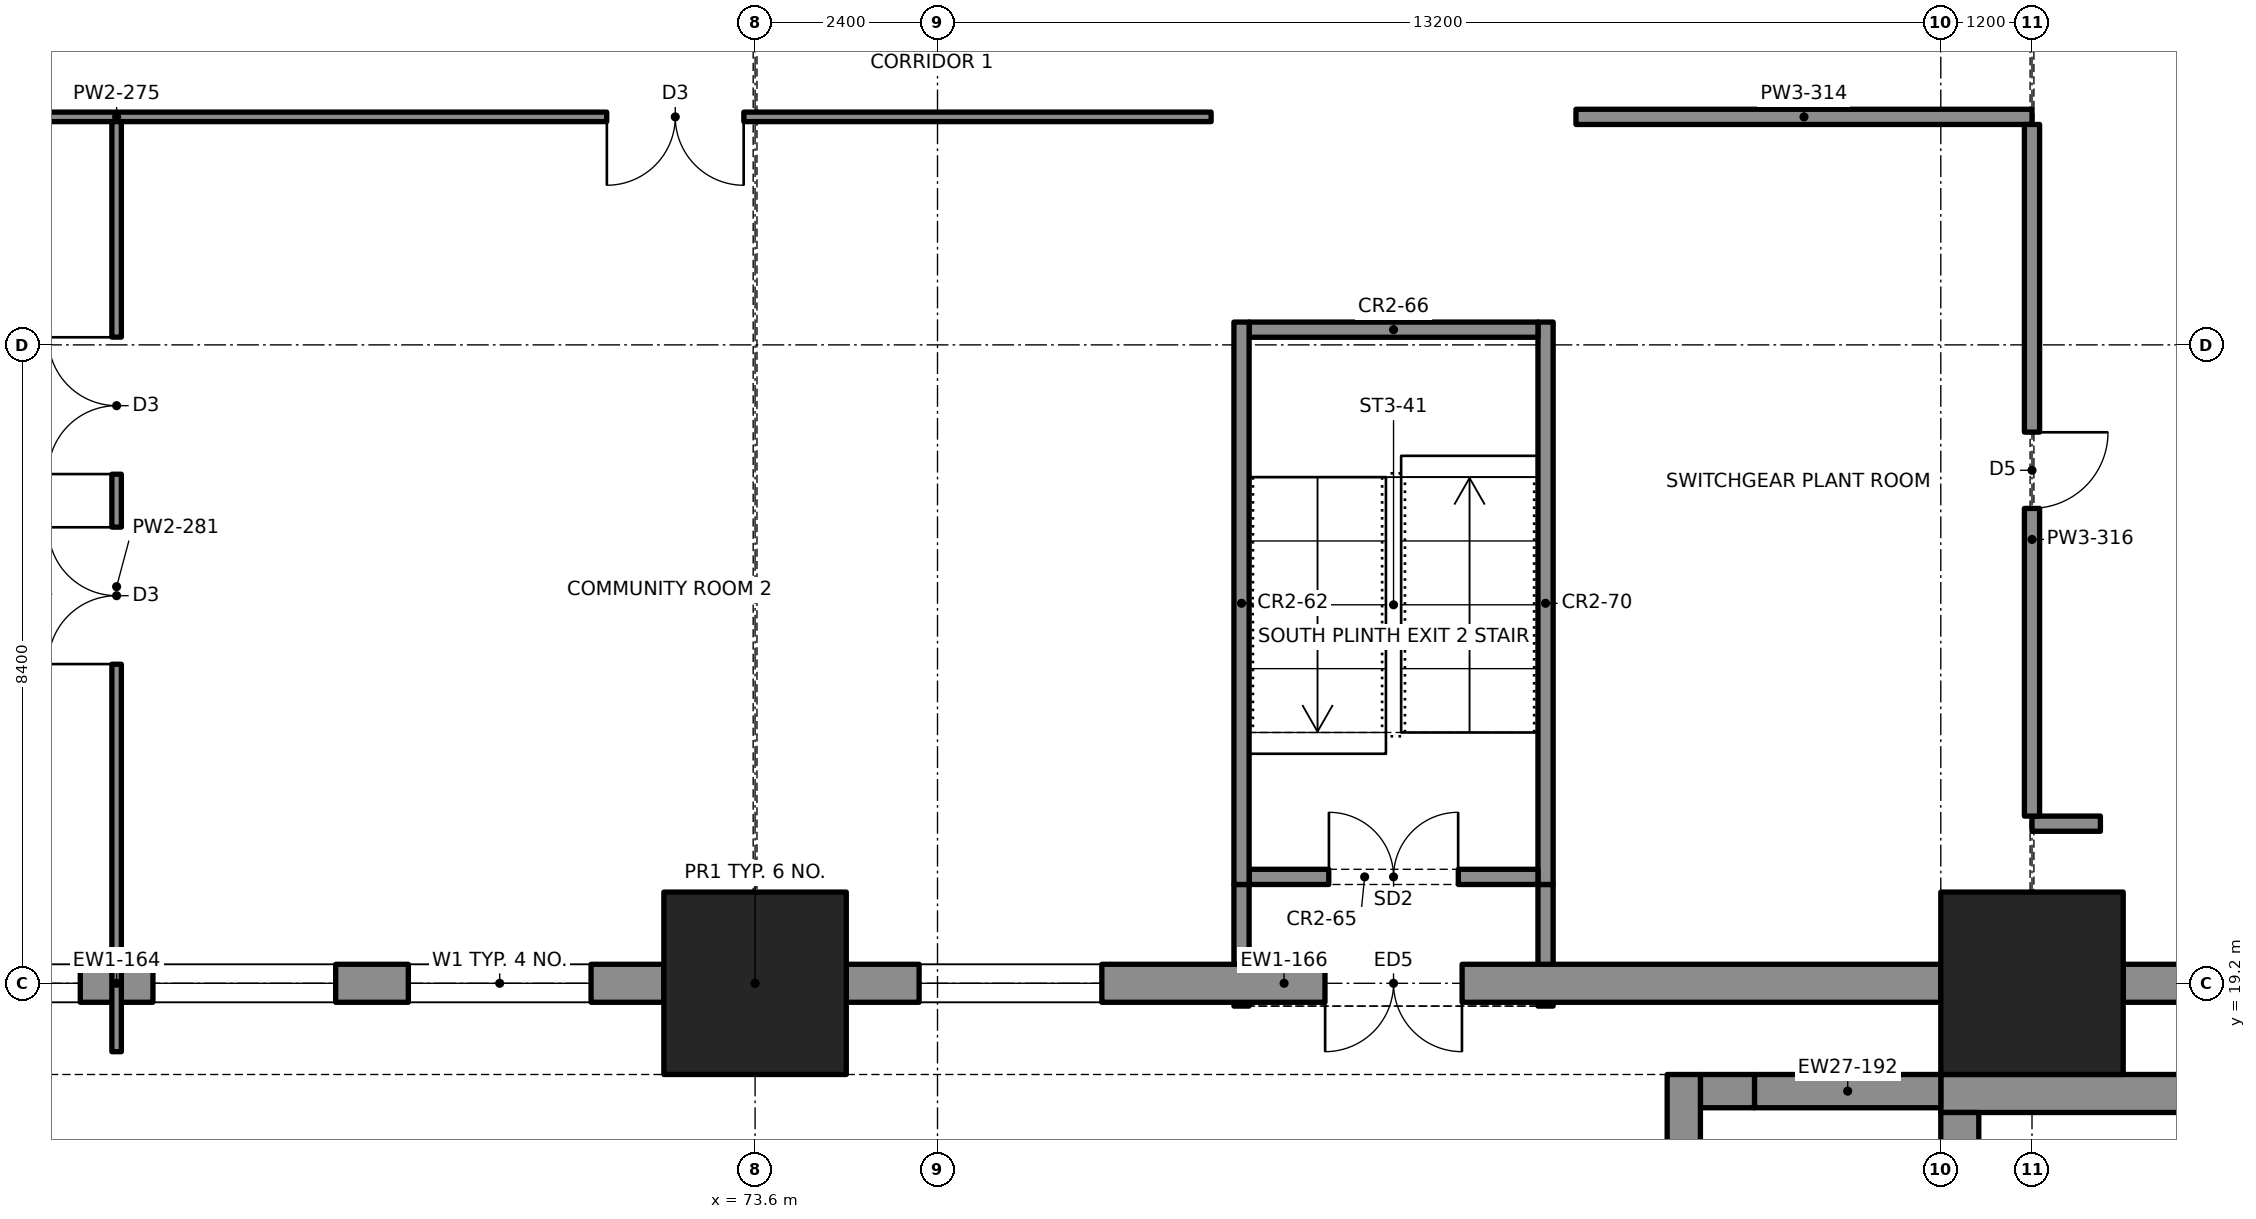
"""IFC4 building model, lengths in metres.
Left out: names, types, materials, properties, quantities, classifications, styles, units other than length and angle.
Written with IfcOpenShell. Run it as: python <this file> out.ifc"""

import sys

from ifc_helpers import new_model, si_unit, direction, frame, frame_2d, origin, origin_2d, place, context, subcontext, project, spatial, rectangle, extrude, element, fill, save


model = new_model("IFC4")
c1 = context("Model", 3, precision=1e-05, world=origin(), true_north=direction((0.0, 1.0)))
c2 = subcontext(c1, "Body", "Model", "MODEL_VIEW")
j1 = project(units=[si_unit("LENGTHUNIT", "METRE"), si_unit("PLANEANGLEUNIT", "RADIAN")], contexts=[c1])
p1 = place(None, origin())
s1 = spatial("IfcSite", under=j1, at=p1, CompositionType="ELEMENT")
p2 = place(p1, origin())
s2 = spatial("IfcBuilding", under=s1, at=p2, CompositionType="ELEMENT")
p3 = place(p2, origin())
s3 = spatial("IfcBuildingStorey", under=s2, at=p3, CompositionType="ELEMENT", Elevation=0.0)
for number, where, z_axis, x_axis in (
    (1, (73.6, 19.2, -0.9), (0.0, 0.0, 1.0), (1.0, 0.0, 0.0)),
    (2, (90.4, 19.2, -0.9), (0.0, 0.0, 1.0), (1.0, 0.0, 0.0)),
):
    element("IfcColumn", number, at=place(p3, frame(where, z_axis=z_axis, x_axis=x_axis)), inside=s3, PredefinedType="COLUMN", context=c2, shape_type="SweptSolid", body=[
        extrude(rectangle(XDim=2.4, YDim=2.4, at=origin_2d()), origin(), (0.0, 0.0, 1.0), 5.3),
    ])
p4 = place(p3, frame((58.0, 19.2, 0.0), z_axis=(0.0, 0.0, 1.0), x_axis=(1.0, 0.0, 0.0)))
e3 = element("IfcWall", 3, at=p4, inside=s3, PredefinedType="SOLIDWALL", context=c2, shape_type="SweptSolid", body=[
    extrude(rectangle(XDim=14.4, YDim=0.5, at=frame_2d((7.2, 0.0))), origin(), (0.0, 0.0, 1.0), 3.65),
])
p5 = place(p4, frame((0.96, 0.0, 0.9)))
e4 = element("IfcOpeningElement", 4, at=p5, cuts=e3, PredefinedType="OPENING", context=c2, shape_type="SweptSolid", body=[
    extrude(rectangle(XDim=2.4, YDim=1.8, at=frame_2d((1.2, 0.9))), frame((0.0, 0.26, 0.0), z_axis=(0.0, -1.0, 0.0), x_axis=(1.0, 0.0, 0.0)), (0.0, 0.0, 1.0), 0.52),
])
p6 = place(p4, frame((4.32, 0.0, 0.9)))
e5 = element("IfcOpeningElement", 5, at=p6, cuts=e3, PredefinedType="OPENING", context=c2, shape_type="SweptSolid", body=[
    extrude(rectangle(XDim=2.4, YDim=1.8, at=frame_2d((1.2, 0.9))), frame((0.0, 0.26, 0.0), z_axis=(0.0, -1.0, 0.0), x_axis=(1.0, 0.0, 0.0)), (0.0, 0.0, 1.0), 0.52),
])
p7 = place(p4, frame((7.68, 0.0, 0.9)))
e6 = element("IfcOpeningElement", 6, at=p7, cuts=e3, PredefinedType="OPENING", context=c2, shape_type="SweptSolid", body=[
    extrude(rectangle(XDim=2.4, YDim=1.8, at=frame_2d((1.2, 0.9))), frame((0.0, 0.26, 0.0), z_axis=(0.0, -1.0, 0.0), x_axis=(1.0, 0.0, 0.0)), (0.0, 0.0, 1.0), 0.52),
])
p8 = place(p4, frame((11.04, 0.0, 0.9)))
e7 = element("IfcOpeningElement", 7, at=p8, cuts=e3, PredefinedType="OPENING", context=c2, shape_type="SweptSolid", body=[
    extrude(rectangle(XDim=2.4, YDim=1.8, at=frame_2d((1.2, 0.9))), frame((0.0, 0.26, 0.0), z_axis=(0.0, -1.0, 0.0), x_axis=(1.0, 0.0, 0.0)), (0.0, 0.0, 1.0), 0.52),
])
p9 = place(p3, frame((74.8, 19.2, 0.0), z_axis=(0.0, 0.0, 1.0), x_axis=(1.0, 0.0, 0.0)))
e8 = element("IfcWall", 8, at=p9, inside=s3, PredefinedType="SOLIDWALL", context=c2, shape_type="SweptSolid", body=[
    extrude(rectangle(XDim=14.4, YDim=0.5, at=frame_2d((7.2, 0.0))), origin(), (0.0, 0.0, 1.0), 3.65),
])
p10 = place(p9, frame((0.96, 0.0, 0.9)))
e9 = element("IfcOpeningElement", 9, at=p10, cuts=e8, PredefinedType="OPENING", context=c2, shape_type="SweptSolid", body=[
    extrude(rectangle(XDim=2.4, YDim=1.8, at=frame_2d((1.2, 0.9))), frame((0.0, 0.26, 0.0), z_axis=(0.0, -1.0, 0.0), x_axis=(1.0, 0.0, 0.0)), (0.0, 0.0, 1.0), 0.52),
])
p11 = place(p9, frame((6.3, 0.0, 0.0)))
e10 = element("IfcOpeningElement", 10, at=p11, cuts=e8, PredefinedType="OPENING", context=c2, shape_type="SweptSolid", body=[
    extrude(rectangle(XDim=1.8, YDim=2.4, at=frame_2d((0.9, 1.2))), frame((0.0, 0.26, 0.0), z_axis=(0.0, -1.0, 0.0), x_axis=(1.0, 0.0, 0.0)), (0.0, 0.0, 1.0), 0.52),
])
p12 = place(p3, frame((91.6, 19.2, 0.0), z_axis=(0.0, 0.0, 1.0), x_axis=(1.0, 0.0, 0.0)))
e11 = element("IfcWall", 11, at=p12, inside=s3, PredefinedType="SOLIDWALL", context=c2, shape_type="SweptSolid", body=[
    extrude(rectangle(XDim=14.4, YDim=0.5, at=frame_2d((7.2, 0.0))), origin(), (0.0, 0.0, 1.0), 3.65),
])
p13 = place(p12, frame((1.2, 0.0, 0.45)))
e12 = element("IfcOpeningElement", 12, at=p13, cuts=e11, PredefinedType="OPENING", context=c2, shape_type="SweptSolid", body=[
    extrude(rectangle(XDim=2.4, YDim=2.7, at=frame_2d((1.2, 1.35))), frame((0.0, 0.26, 0.0), z_axis=(0.0, -1.0, 0.0), x_axis=(1.0, 0.0, 0.0)), (0.0, 0.0, 1.0), 0.52),
])
p14 = place(p12, frame((10.8, 0.0, 0.45)))
e13 = element("IfcOpeningElement", 13, at=p14, cuts=e11, PredefinedType="OPENING", context=c2, shape_type="SweptSolid", body=[
    extrude(rectangle(XDim=2.4, YDim=2.7, at=frame_2d((1.2, 1.35))), frame((0.0, 0.26, 0.0), z_axis=(0.0, -1.0, 0.0), x_axis=(1.0, 0.0, 0.0)), (0.0, 0.0, 1.0), 0.52),
])
p15 = place(p12, frame((5.4, 0.0, 0.0)))
e14 = element("IfcOpeningElement", 14, at=p15, cuts=e11, PredefinedType="OPENING", context=c2, shape_type="SweptSolid", body=[
    extrude(rectangle(XDim=3.6, YDim=2.7, at=frame_2d((1.8, 1.35))), frame((0.0, 0.26, 0.0), z_axis=(0.0, -1.0, 0.0), x_axis=(1.0, 0.0, 0.0)), (0.0, 0.0, 1.0), 0.52),
])
p16 = place(p3, frame((89.45, 6.5, 0.0), z_axis=(0.0, 0.0, 1.0), x_axis=(0.0, 1.0, 0.0)))
e15 = element("IfcWall", 15, at=p16, inside=s3, PredefinedType="SOLIDWALL", context=c2, shape_type="SweptSolid", body=[
    extrude(rectangle(XDim=11.0, YDim=0.5, at=frame_2d((5.5, 0.0))), origin(), (0.0, 0.0, 1.0), 4.4),
])
p17 = place(p3, frame((89.2, 17.75, 0.0), z_axis=(0.0, 0.0, 1.0), x_axis=(1.0, 0.0, 0.0)))
e16 = element("IfcWall", 16, at=p17, inside=s3, PredefinedType="SOLIDWALL", context=c2, shape_type="SweptSolid", body=[
    extrude(rectangle(XDim=19.2, YDim=0.5, at=frame_2d((9.6, 0.0))), origin(), (0.0, 0.0, 1.0), 4.4),
])
p18 = place(p3, frame((85.819, 6.0, 0.0), z_axis=(0.0, 0.0, 1.0), x_axis=(0.0, 1.0, 0.0)))
e17 = element("IfcWall", 17, at=p18, inside=s3, PredefinedType="SOLIDWALL", context=c2, shape_type="SweptSolid", body=[
    extrude(rectangle(XDim=12.0, YDim=0.438, at=frame_2d((6.0, 0.0))), origin(), (0.0, 0.0, 1.0), 4.4),
])
p19 = place(p18, frame((1.8, 0.0, 0.9)))
e18 = element("IfcOpeningElement", 18, at=p19, cuts=e17, PredefinedType="OPENING", context=c2, shape_type="SweptSolid", body=[
    extrude(rectangle(XDim=2.4, YDim=2.4, at=frame_2d((1.2, 1.2))), frame((0.0, 0.229, 0.0), z_axis=(0.0, -1.0, 0.0), x_axis=(1.0, 0.0, 0.0)), (0.0, 0.0, 1.0), 0.458),
])
p20 = place(p18, frame((7.5, 0.0, 0.9)))
e19 = element("IfcOpeningElement", 19, at=p20, cuts=e17, PredefinedType="OPENING", context=c2, shape_type="SweptSolid", body=[
    extrude(rectangle(XDim=2.4, YDim=2.4, at=frame_2d((1.2, 1.2))), frame((0.0, 0.229, 0.0), z_axis=(0.0, -1.0, 0.0), x_axis=(1.0, 0.0, 0.0)), (0.0, 0.0, 1.0), 0.458),
])
p21 = place(p3, frame((86.038, 17.781, 0.0), z_axis=(0.0, 0.0, 1.0), x_axis=(1.0, 0.0, 0.0)))
e20 = element("IfcWall", 20, at=p21, inside=s3, PredefinedType="SOLIDWALL", context=c2, shape_type="SweptSolid", body=[
    extrude(rectangle(XDim=0.712, YDim=0.438, at=frame_2d((0.356, 0.0))), origin(), (0.0, 0.0, 1.0), 4.4),
])
p22 = place(p3, frame((86.75, 17.781, -0.9), z_axis=(0.0, 0.0, 1.0), x_axis=(1.0, 0.0, 0.0)))
e21 = element("IfcWall", 21, at=p22, inside=s3, PredefinedType="SOLIDWALL", context=c2, shape_type="SweptSolid", body=[
    extrude(rectangle(XDim=2.45, YDim=0.438, at=frame_2d((1.225, 0.0))), origin(), (0.0, 0.0, 1.0), 5.3),
])
for number, where, z_axis, x_axis in (
    (22, (80.0, 20.5, 0.0), (0.0, 0.0, 1.0), (0.0, 1.0, 0.0)),
    (23, (84.0, 20.5, 0.0), (0.0, 0.0, 1.0), (0.0, 1.0, 0.0)),
):
    element("IfcWall", number, at=place(p3, frame(where, z_axis=z_axis, x_axis=x_axis)), inside=s3, PredefinedType="SOLIDWALL", context=c2, shape_type="SweptSolid", body=[
        extrude(rectangle(XDim=7.4, YDim=0.2, at=frame_2d((3.7, 0.0))), origin(), (0.0, 0.0, 1.0), 4.4),
    ])
p23 = place(p3, frame((80.1, 20.6, 0.0), z_axis=(0.0, 0.0, 1.0), x_axis=(1.0, 0.0, 0.0)))
e24 = element("IfcWall", 24, at=p23, inside=s3, PredefinedType="SOLIDWALL", context=c2, shape_type="SweptSolid", body=[
    extrude(rectangle(XDim=3.8, YDim=0.2, at=frame_2d((1.9, 0.0))), origin(), (0.0, 0.0, 1.0), 4.4),
])
p24 = place(p23, frame((1.05, 0.0, 0.0)))
e25 = element("IfcOpeningElement", 25, at=p24, cuts=e24, PredefinedType="OPENING", context=c2, shape_type="SweptSolid", body=[
    extrude(rectangle(XDim=1.7, YDim=2.1, at=frame_2d((0.85, 1.05))), frame((0.0, 0.11, 0.0), z_axis=(0.0, -1.0, 0.0), x_axis=(1.0, 0.0, 0.0)), (0.0, 0.0, 1.0), 0.22),
])
p25 = place(p3, frame((80.1, 27.8, 0.0), z_axis=(0.0, 0.0, 1.0), x_axis=(1.0, 0.0, 0.0)))
e26 = element("IfcWall", 26, at=p25, inside=s3, PredefinedType="SOLIDWALL", context=c2, shape_type="SweptSolid", body=[
    extrude(rectangle(XDim=3.8, YDim=0.2, at=frame_2d((1.9, 0.0))), origin(), (0.0, 0.0, 1.0), 4.4),
])
for number, where, z_axis, x_axis in (
    (27, (80.0, 18.9, 0.0), (0.0, 0.0, 1.0), (0.0, 1.0, 0.0)),
    (28, (84.0, 18.9, 0.0), (0.0, 0.0, 1.0), (0.0, 1.0, 0.0)),
):
    element("IfcWall", number, at=place(p3, frame(where, z_axis=z_axis, x_axis=x_axis)), inside=s3, PredefinedType="SOLIDWALL", context=c2, shape_type="SweptSolid", body=[
        extrude(rectangle(XDim=1.6, YDim=0.2, at=frame_2d((0.8, 0.0))), origin(), (0.0, 0.0, 1.0), 4.4),
    ])
p26 = place(p3, frame((90.4, 21.3, 0.0), z_axis=(0.0, 0.0, 1.0), x_axis=(1.0, 0.0, 0.0)))
e29 = element("IfcWall", 29, at=p26, inside=s3, PredefinedType="PARTITIONING", context=c2, shape_type="SweptSolid", body=[
    extrude(rectangle(XDim=0.9, YDim=0.2, at=frame_2d((0.45, 0.0))), origin(), (0.0, 0.0, 1.0), 3.65),
])
p27 = place(p3, frame((50.8, 30.6, 0.0), z_axis=(0.0, 0.0, 1.0), x_axis=(1.0, 0.0, 0.0)))
e30 = element("IfcWall", 30, at=p27, inside=s3, PredefinedType="PARTITIONING", context=c2, shape_type="SweptSolid", body=[
    extrude(rectangle(XDim=28.8, YDim=0.125, at=frame_2d((14.4, 0.0))), origin(), (0.0, 0.0, 1.0), 3.65),
])
p28 = place(p27, frame((6.15, 0.0, 0.0)))
e31 = element("IfcOpeningElement", 31, at=p28, cuts=e30, PredefinedType="OPENING", context=c2, shape_type="SweptSolid", body=[
    extrude(rectangle(XDim=1.8, YDim=2.1, at=frame_2d((0.9, 1.05))), frame((0.0, 0.073, 0.0), z_axis=(0.0, -1.0, 0.0), x_axis=(1.0, 0.0, 0.0)), (0.0, 0.0, 1.0), 0.145),
])
p29 = place(p27, frame((20.85, 0.0, 0.0)))
e32 = element("IfcOpeningElement", 32, at=p29, cuts=e30, PredefinedType="OPENING", context=c2, shape_type="SweptSolid", body=[
    extrude(rectangle(XDim=1.8, YDim=2.1, at=frame_2d((0.9, 1.05))), frame((0.0, 0.073, 0.0), z_axis=(0.0, -1.0, 0.0), x_axis=(1.0, 0.0, 0.0)), (0.0, 0.0, 1.0), 0.145),
])
p30 = place(p3, frame((84.4, 30.6, 0.0), z_axis=(0.0, 0.0, 1.0), x_axis=(1.0, 0.0, 0.0)))
e33 = element("IfcWall", 33, at=p30, inside=s3, PredefinedType="PARTITIONING", context=c2, shape_type="SweptSolid", body=[
    extrude(rectangle(XDim=6.0, YDim=0.2, at=frame_2d((3.0, 0.0))), origin(), (0.0, 0.0, 1.0), 3.65),
])
p31 = place(p3, frame((65.2, 18.3, 0.0), z_axis=(0.0, 0.0, 1.0), x_axis=(0.0, 1.0, 0.0)))
e34 = element("IfcWall", 34, at=p31, inside=s3, PredefinedType="PARTITIONING", context=c2, shape_type="SweptSolid", body=[
    extrude(rectangle(XDim=12.238, YDim=0.125, at=frame_2d((6.119, 0.0))), origin(), (0.0, 0.0, 1.0), 3.65),
])
p32 = place(p31, frame((5.1, 0.0, 0.0)))
e35 = element("IfcOpeningElement", 35, at=p32, cuts=e34, PredefinedType="OPENING", context=c2, shape_type="SweptSolid", body=[
    extrude(rectangle(XDim=1.8, YDim=2.1, at=frame_2d((0.9, 1.05))), frame((0.0, 0.073, 0.0), z_axis=(0.0, -1.0, 0.0), x_axis=(1.0, 0.0, 0.0)), (0.0, 0.0, 1.0), 0.145),
])
p33 = place(p31, frame((7.6, 0.0, 0.0)))
e36 = element("IfcOpeningElement", 36, at=p33, cuts=e34, PredefinedType="OPENING", context=c2, shape_type="SweptSolid", body=[
    extrude(rectangle(XDim=1.8, YDim=2.1, at=frame_2d((0.9, 1.05))), frame((0.0, 0.073, 0.0), z_axis=(0.0, -1.0, 0.0), x_axis=(1.0, 0.0, 0.0)), (0.0, 0.0, 1.0), 0.145),
])
p34 = place(p3, frame((90.4, 21.4, 0.0), z_axis=(0.0, 0.0, 1.0), x_axis=(0.0, 1.0, 0.0)))
e37 = element("IfcWall", 37, at=p34, inside=s3, PredefinedType="PARTITIONING", context=c2, shape_type="SweptSolid", body=[
    extrude(rectangle(XDim=9.1, YDim=0.2, at=frame_2d((4.55, 0.0))), origin(), (0.0, 0.0, 1.0), 3.65),
])
p35 = place(p34, frame((4.05, 0.0, 0.0)))
e38 = element("IfcOpeningElement", 38, at=p35, cuts=e37, PredefinedType="OPENING", context=c2, shape_type="SweptSolid", body=[
    extrude(rectangle(XDim=1.0, YDim=2.1, at=frame_2d((0.5, 1.05))), frame((0.0, 0.11, 0.0), z_axis=(0.0, -1.0, 0.0), x_axis=(1.0, 0.0, 0.0)), (0.0, 0.0, 1.0), 0.22),
])
p36 = place(p6, origin())
e39 = element("IfcWindow", 39, at=p36, inside=s3, PartitioningType="SINGLE_PANEL", PredefinedType="WINDOW", context=c2, shape_type="SweptSolid", body=[
    extrude(rectangle(XDim=2.4, YDim=1.8, at=frame_2d((1.2, 0.9))), frame((0.0, 0.03, 0.0), z_axis=(0.0, -1.0, 0.0), x_axis=(1.0, 0.0, 0.0)), (0.0, 0.0, 1.0), 0.06),
])
fill(e5, e39)
p37 = place(p7, origin())
e40 = element("IfcWindow", 40, at=p37, inside=s3, PartitioningType="SINGLE_PANEL", PredefinedType="WINDOW", context=c2, shape_type="SweptSolid", body=[
    extrude(rectangle(XDim=2.4, YDim=1.8, at=frame_2d((1.2, 0.9))), frame((0.0, 0.03, 0.0), z_axis=(0.0, -1.0, 0.0), x_axis=(1.0, 0.0, 0.0)), (0.0, 0.0, 1.0), 0.06),
])
fill(e6, e40)
p38 = place(p8, origin())
e41 = element("IfcWindow", 41, at=p38, inside=s3, PartitioningType="SINGLE_PANEL", PredefinedType="WINDOW", context=c2, shape_type="SweptSolid", body=[
    extrude(rectangle(XDim=2.4, YDim=1.8, at=frame_2d((1.2, 0.9))), frame((0.0, 0.03, 0.0), z_axis=(0.0, -1.0, 0.0), x_axis=(1.0, 0.0, 0.0)), (0.0, 0.0, 1.0), 0.06),
])
fill(e7, e41)
p39 = place(p10, origin())
e42 = element("IfcWindow", 42, at=p39, inside=s3, PartitioningType="SINGLE_PANEL", PredefinedType="WINDOW", context=c2, shape_type="SweptSolid", body=[
    extrude(rectangle(XDim=2.4, YDim=1.8, at=frame_2d((1.2, 0.9))), frame((0.0, 0.03, 0.0), z_axis=(0.0, -1.0, 0.0), x_axis=(1.0, 0.0, 0.0)), (0.0, 0.0, 1.0), 0.06),
])
fill(e9, e42)
p40 = place(p11, origin())
e43 = element("IfcDoor", 43, at=p40, inside=s3, OperationType="DOUBLE_DOOR_SINGLE_SWING", PredefinedType="DOOR", context=c2, shape_type="SweptSolid", body=[
    extrude(rectangle(XDim=1.8, YDim=2.4, at=frame_2d((0.9, 1.2))), frame((0.0, 0.025, 0.0), z_axis=(0.0, -1.0, 0.0), x_axis=(1.0, 0.0, 0.0)), (0.0, 0.0, 1.0), 0.05),
])
fill(e10, e43)
p41 = place(p24, origin())
e44 = element("IfcDoor", 44, at=p41, inside=s3, OperationType="DOUBLE_DOOR_SINGLE_SWING", PredefinedType="DOOR", context=c2, shape_type="SweptSolid", body=[
    extrude(rectangle(XDim=1.7, YDim=2.1, at=frame_2d((0.85, 1.05))), frame((0.0, 0.025, 0.0), z_axis=(0.0, -1.0, 0.0), x_axis=(1.0, 0.0, 0.0)), (0.0, 0.0, 1.0), 0.05),
])
fill(e25, e44)
p42 = place(p29, origin())
e45 = element("IfcDoor", 45, at=p42, inside=s3, OperationType="DOUBLE_DOOR_SINGLE_SWING", PredefinedType="DOOR", context=c2, shape_type="SweptSolid", body=[
    extrude(rectangle(XDim=1.8, YDim=2.1, at=frame_2d((0.9, 1.05))), frame((0.0, 0.025, 0.0), z_axis=(0.0, -1.0, 0.0), x_axis=(1.0, 0.0, 0.0)), (0.0, 0.0, 1.0), 0.05),
])
fill(e32, e45)
p43 = place(p35, origin())
e46 = element("IfcDoor", 46, at=p43, inside=s3, OperationType="SINGLE_SWING_RIGHT", PredefinedType="DOOR", context=c2, shape_type="SweptSolid", body=[
    extrude(rectangle(XDim=1.0, YDim=2.1, at=frame_2d((0.5, 1.05))), frame((0.0, 0.025, 0.0), z_axis=(0.0, -1.0, 0.0), x_axis=(1.0, 0.0, 0.0)), (0.0, 0.0, 1.0), 0.05),
])
fill(e38, e46)
p44 = place(p32, origin())
e47 = element("IfcDoor", 47, at=p44, inside=s3, OperationType="DOUBLE_DOOR_SINGLE_SWING", PredefinedType="DOOR", context=c2, shape_type="SweptSolid", body=[
    extrude(rectangle(XDim=1.8, YDim=2.1, at=frame_2d((0.9, 1.05))), frame((0.0, 0.025, 0.0), z_axis=(0.0, -1.0, 0.0), x_axis=(1.0, 0.0, 0.0)), (0.0, 0.0, 1.0), 0.05),
])
fill(e35, e47)
p45 = place(p33, origin())
e48 = element("IfcDoor", 48, at=p45, inside=s3, OperationType="DOUBLE_DOOR_SINGLE_SWING", PredefinedType="DOOR", context=c2, shape_type="SweptSolid", body=[
    extrude(rectangle(XDim=1.8, YDim=2.1, at=frame_2d((0.9, 1.05))), frame((0.0, 0.025, 0.0), z_axis=(0.0, -1.0, 0.0), x_axis=(1.0, 0.0, 0.0)), (0.0, 0.0, 1.0), 0.05),
])
fill(e36, e48)
save(model, sys.argv[1])
